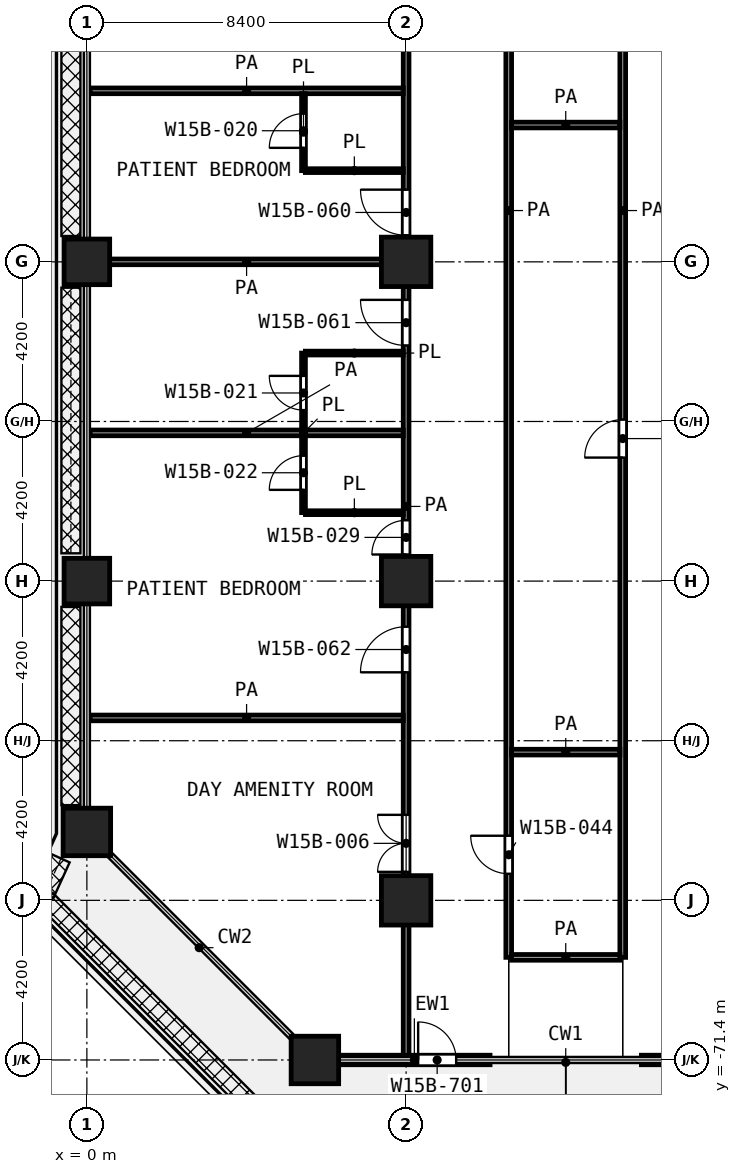
"""IFC4 building model, lengths in metres.
Left out: names, types, materials, properties, quantities, classifications, styles, units other than length and angle.
Written with IfcOpenShell. Run it as: python <this file> out.ifc"""

import sys

from ifc_helpers import new_model, si_unit, direction, frame, frame_2d, origin, origin_2d, place, context, subcontext, project, spatial, rectangle, extrude, element, fill, save


model = new_model("IFC4")
c1 = context("Model", 3, precision=1e-05, world=origin(), true_north=direction((0.0, 1.0)))
c2 = subcontext(c1, "Body", "Model", "MODEL_VIEW")
j1 = project(units=[si_unit("LENGTHUNIT", "METRE"), si_unit("PLANEANGLEUNIT", "RADIAN")], contexts=[c1])
p1 = place(None, origin())
s1 = spatial("IfcSite", under=j1, at=p1, CompositionType="ELEMENT")
p2 = place(p1, origin())
s2 = spatial("IfcBuilding", under=s1, at=p2, CompositionType="ELEMENT")
p3 = place(p2, frame((0.0, 0.0, 85.4)))
s3 = spatial("IfcBuildingStorey", under=s2, at=p3, CompositionType="ELEMENT", Elevation=85.4)
p4 = place(p3, frame((0.0, -50.4, 0.0), z_axis=(0.0, 0.0, 1.0), x_axis=(1.0, 0.0, 0.0)))
e1 = element("IfcColumn", 1, at=p4, inside=s3, PredefinedType="COLUMN", context=c2, shape_type="SweptSolid", body=[
    extrude(rectangle(XDim=1.2, YDim=1.2, at=origin_2d()), origin(), (0.0, 0.0, 1.0), 4.2),
])
p5 = place(p3, frame((8.4, -50.4, 0.0), z_axis=(0.0, 0.0, 1.0), x_axis=(1.0, 0.0, 0.0)))
e2 = element("IfcColumn", 2, at=p5, inside=s3, PredefinedType="COLUMN", context=c2, shape_type="SweptSolid", body=[
    extrude(rectangle(XDim=1.3, YDim=1.3, at=origin_2d()), origin(), (0.0, 0.0, 1.0), 4.2),
])
p6 = place(p3, frame((0.0, -58.8, 0.0), z_axis=(0.0, 0.0, 1.0), x_axis=(1.0, 0.0, 0.0)))
e3 = element("IfcColumn", 3, at=p6, inside=s3, PredefinedType="COLUMN", context=c2, shape_type="SweptSolid", body=[
    extrude(rectangle(XDim=1.2, YDim=1.2, at=origin_2d()), origin(), (0.0, 0.0, 1.0), 4.2),
])
p7 = place(p3, frame((8.4, -58.8, 0.0), z_axis=(0.0, 0.0, 1.0), x_axis=(1.0, 0.0, 0.0)))
e4 = element("IfcColumn", 4, at=p7, inside=s3, PredefinedType="COLUMN", context=c2, shape_type="SweptSolid", body=[
    extrude(rectangle(XDim=1.3, YDim=1.3, at=origin_2d()), origin(), (0.0, 0.0, 1.0), 4.2),
])
p8 = place(p3, frame((0.0, -65.4, 0.0), z_axis=(0.0, 0.0, 1.0), x_axis=(1.0, 0.0, 0.0)))
e5 = element("IfcColumn", 5, at=p8, inside=s3, PredefinedType="COLUMN", context=c2, shape_type="SweptSolid", body=[
    extrude(rectangle(XDim=1.25, YDim=1.25, at=origin_2d()), origin(), (0.0, 0.0, 1.0), 4.2),
])
p9 = place(p3, frame((8.4, -67.2, 0.0), z_axis=(0.0, 0.0, 1.0), x_axis=(1.0, 0.0, 0.0)))
e6 = element("IfcColumn", 6, at=p9, inside=s3, PredefinedType="COLUMN", context=c2, shape_type="SweptSolid", body=[
    extrude(rectangle(XDim=1.3, YDim=1.3, at=origin_2d()), origin(), (0.0, 0.0, 1.0), 4.2),
])
p10 = place(p3, frame((6.0, -71.4, 0.0), z_axis=(0.0, 0.0, 1.0), x_axis=(1.0, 0.0, 0.0)))
e7 = element("IfcColumn", 7, at=p10, inside=s3, PredefinedType="COLUMN", context=c2, shape_type="SweptSolid", body=[
    extrude(rectangle(XDim=1.25, YDim=1.25, at=origin_2d()), origin(), (0.0, 0.0, 1.0), 4.2),
])
p11 = place(p3, frame((6.625, -71.4, 0.0), z_axis=(0.0, 0.0, 1.0), x_axis=(1.0, 0.0, 0.0)))
e8 = element("IfcWall", 8, at=p11, inside=s3, PredefinedType="SOLIDWALL", context=c2, shape_type="SweptSolid", body=[
    extrude(rectangle(XDim=3.983, YDim=0.25, at=frame_2d((1.992, 0.0))), origin(), (0.0, 0.0, 1.0), 3.78),
])
p12 = place(p11, frame((2.092, 0.0, 0.0)))
e9 = element("IfcOpeningElement", 9, at=p12, cuts=e8, PredefinedType="OPENING", context=c2, shape_type="SweptSolid", body=[
    extrude(rectangle(XDim=1.0, YDim=2.1, at=frame_2d((0.5, 1.05))), frame((0.0, 0.135, 0.0), z_axis=(0.0, -1.0, 0.0), x_axis=(1.0, 0.0, 0.0)), (0.0, 0.0, 1.0), 0.27),
])
p13 = place(p3, frame((14.592, -71.4, 0.0), z_axis=(0.0, 0.0, 1.0), x_axis=(1.0, 0.0, 0.0)))
e10 = element("IfcWall", 10, at=p13, inside=s3, PredefinedType="SOLIDWALL", context=c2, shape_type="SweptSolid", body=[
    extrude(rectangle(XDim=3.983, YDim=0.25, at=frame_2d((1.992, 0.0))), origin(), (0.0, 0.0, 1.0), 3.78),
])
p14 = place(p13, frame((0.892, 0.0, 0.0)))
e11 = element("IfcOpeningElement", 11, at=p14, cuts=e10, PredefinedType="OPENING", context=c2, shape_type="SweptSolid", body=[
    extrude(rectangle(XDim=1.0, YDim=2.1, at=frame_2d((0.5, 1.05))), frame((0.0, 0.135, 0.0), z_axis=(0.0, -1.0, 0.0), x_axis=(1.0, 0.0, 0.0)), (0.0, 0.0, 1.0), 0.27),
])
p15 = place(p3, frame((5.751, -57.0, 0.0), z_axis=(0.0, 0.0, 1.0), x_axis=(1.0, 0.0, 0.0)))
e12 = element("IfcWall", 12, at=p15, inside=s3, PredefinedType="PARTITIONING", context=c2, shape_type="SweptSolid", body=[
    extrude(rectangle(XDim=2.574, YDim=0.1, at=frame_2d((1.287, 0.0))), origin(), (0.0, 0.0, 1.0), 3.9),
])
for number, where, z_axis, x_axis in (
    (13, (5.75, -52.8, 0.0), (0.0, 0.0, 1.0), (1.0, 0.0, 0.0)),
    (14, (5.75, -48.0, 0.0), (0.0, 0.0, 1.0), (1.0, 0.0, 0.0)),
):
    element("IfcWall", number, at=place(p3, frame(where, z_axis=z_axis, x_axis=x_axis)), inside=s3, PredefinedType="PARTITIONING", context=c2, shape_type="SweptSolid", body=[
        extrude(rectangle(XDim=2.575, YDim=0.1, at=frame_2d((1.288, 0.0))), origin(), (0.0, 0.0, 1.0), 3.9),
    ])
p16 = place(p3, frame((5.7, -56.998, 0.0), z_axis=(0.0, 0.0, 1.0), x_axis=(0.0, 1.0, 0.0)))
e15 = element("IfcWall", 15, at=p16, inside=s3, PredefinedType="PARTITIONING", context=c2, shape_type="SweptSolid", body=[
    extrude(rectangle(XDim=4.198, YDim=0.1, at=frame_2d((2.099, 0.0))), origin(), (0.0, 0.0, 1.0), 3.9),
])
p17 = place(p16, frame((2.698, 0.0, 0.0)))
e16 = element("IfcOpeningElement", 16, at=p17, cuts=e15, PredefinedType="OPENING", context=c2, shape_type="SweptSolid", body=[
    extrude(rectangle(XDim=0.9, YDim=2.1, at=frame_2d((0.45, 1.05))), frame((0.0, 0.06, 0.0), z_axis=(0.0, -1.0, 0.0), x_axis=(1.0, 0.0, 0.0)), (0.0, 0.0, 1.0), 0.12),
])
p18 = place(p16, frame((0.599, 0.0, 0.0)))
e17 = element("IfcOpeningElement", 17, at=p18, cuts=e15, PredefinedType="OPENING", context=c2, shape_type="SweptSolid", body=[
    extrude(rectangle(XDim=0.9, YDim=2.1, at=frame_2d((0.45, 1.05))), frame((0.0, 0.06, 0.0), z_axis=(0.0, -1.0, 0.0), x_axis=(1.0, 0.0, 0.0)), (0.0, 0.0, 1.0), 0.12),
])
p19 = place(p3, frame((5.7, -48.0, 0.0), z_axis=(0.0, 0.0, 1.0), x_axis=(0.0, 1.0, 0.0)))
e18 = element("IfcWall", 18, at=p19, inside=s3, PredefinedType="PARTITIONING", context=c2, shape_type="SweptSolid", body=[
    extrude(rectangle(XDim=2.025, YDim=0.1, at=frame_2d((1.012, 0.0))), origin(), (0.0, 0.0, 1.0), 3.9),
])
p20 = place(p19, frame((0.6, 0.0, 0.0)))
e19 = element("IfcOpeningElement", 19, at=p20, cuts=e18, PredefinedType="OPENING", context=c2, shape_type="SweptSolid", body=[
    extrude(rectangle(XDim=0.9, YDim=2.1, at=frame_2d((0.45, 1.05))), frame((0.0, 0.06, 0.0), z_axis=(0.0, -1.0, 0.0), x_axis=(1.0, 0.0, 0.0)), (0.0, 0.0, 1.0), 0.12),
])
for number, where, z_axis, x_axis in (
    (20, (11.175, -68.7, 0.0), (0.0, 0.0, 1.0), (1.0, 0.0, 0.0)),
    (21, (11.175, -63.3, 0.0), (0.0, 0.0, 1.0), (1.0, 0.0, 0.0)),
):
    element("IfcWall", number, at=place(p3, frame(where, z_axis=z_axis, x_axis=x_axis)), inside=s3, PredefinedType="PARTITIONING", context=c2, shape_type="SweptSolid", body=[
        extrude(rectangle(XDim=2.85, YDim=0.15, at=frame_2d((1.425, 0.0))), origin(), (0.0, 0.0, 1.0), 3.9),
    ])
for number, where, z_axis, x_axis in (
    (22, (0.08, -62.4, 0.0), (0.0, 0.0, 1.0), (1.0, 0.0, 0.0)),
    (23, (0.08, -54.9, 0.0), (0.0, 0.0, 1.0), (1.0, 0.0, 0.0)),
    (24, (0.08, -50.4, 0.0), (0.0, 0.0, 1.0), (1.0, 0.0, 0.0)),
):
    element("IfcWall", number, at=place(p3, frame(where, z_axis=z_axis, x_axis=x_axis)), inside=s3, PredefinedType="PARTITIONING", context=c2, shape_type="SweptSolid", body=[
        extrude(rectangle(XDim=8.245, YDim=0.15, at=frame_2d((4.123, 0.0))), origin(), (0.0, 0.0, 1.0), 3.9),
    ])
p21 = place(p3, frame((11.175, -46.8, 0.0), z_axis=(0.0, 0.0, 1.0), x_axis=(1.0, 0.0, 0.0)))
e25 = element("IfcWall", 25, at=p21, inside=s3, PredefinedType="PARTITIONING", context=c2, shape_type="SweptSolid", body=[
    extrude(rectangle(XDim=2.85, YDim=0.15, at=frame_2d((1.425, 0.0))), origin(), (0.0, 0.0, 1.0), 3.9),
])
p22 = place(p3, frame((0.08, -45.9, 0.0), z_axis=(0.0, 0.0, 1.0), x_axis=(1.0, 0.0, 0.0)))
e26 = element("IfcWall", 26, at=p22, inside=s3, PredefinedType="PARTITIONING", context=c2, shape_type="SweptSolid", body=[
    extrude(rectangle(XDim=8.245, YDim=0.15, at=frame_2d((4.123, 0.0))), origin(), (0.0, 0.0, 1.0), 3.9),
])
p23 = place(p3, frame((8.4, -71.32, 0.0), z_axis=(0.0, 0.0, 1.0), x_axis=(0.0, 1.0, 0.0)))
e27 = element("IfcWall", 27, at=p23, inside=s3, PredefinedType="PARTITIONING", context=c2, shape_type="SweptSolid", body=[
    extrude(rectangle(XDim=28.97, YDim=0.15, at=frame_2d((14.485, 0.0))), origin(), (0.0, 0.0, 1.0), 3.9),
])
p24 = place(p23, frame((21.62, 0.0, 0.0)))
e28 = element("IfcOpeningElement", 28, at=p24, cuts=e27, PredefinedType="OPENING", context=c2, shape_type="SweptSolid", body=[
    extrude(rectangle(XDim=1.2, YDim=2.1, at=frame_2d((0.6, 1.05))), frame((0.0, 0.085, 0.0), z_axis=(0.0, -1.0, 0.0), x_axis=(1.0, 0.0, 0.0)), (0.0, 0.0, 1.0), 0.17),
])
p25 = place(p23, frame((18.72, 0.0, 0.0)))
e29 = element("IfcOpeningElement", 29, at=p25, cuts=e27, PredefinedType="OPENING", context=c2, shape_type="SweptSolid", body=[
    extrude(rectangle(XDim=1.2, YDim=2.1, at=frame_2d((0.6, 1.05))), frame((0.0, 0.085, 0.0), z_axis=(0.0, -1.0, 0.0), x_axis=(1.0, 0.0, 0.0)), (0.0, 0.0, 1.0), 0.17),
])
p26 = place(p23, frame((10.12, 0.0, 0.0)))
e30 = element("IfcOpeningElement", 30, at=p26, cuts=e27, PredefinedType="OPENING", context=c2, shape_type="SweptSolid", body=[
    extrude(rectangle(XDim=1.2, YDim=2.1, at=frame_2d((0.6, 1.05))), frame((0.0, 0.085, 0.0), z_axis=(0.0, -1.0, 0.0), x_axis=(1.0, 0.0, 0.0)), (0.0, 0.0, 1.0), 0.17),
])
p27 = place(p23, frame((13.22, 0.0, 0.0)))
e31 = element("IfcOpeningElement", 31, at=p27, cuts=e27, PredefinedType="OPENING", context=c2, shape_type="SweptSolid", body=[
    extrude(rectangle(XDim=0.9, YDim=2.1, at=frame_2d((0.45, 1.05))), frame((0.0, 0.085, 0.0), z_axis=(0.0, -1.0, 0.0), x_axis=(1.0, 0.0, 0.0)), (0.0, 0.0, 1.0), 0.17),
])
p28 = place(p23, frame((4.87, 0.0, 0.0)))
e32 = element("IfcOpeningElement", 32, at=p28, cuts=e27, PredefinedType="OPENING", context=c2, shape_type="SweptSolid", body=[
    extrude(rectangle(XDim=1.5, YDim=2.1, at=frame_2d((0.75, 1.05))), frame((0.0, 0.085, 0.0), z_axis=(0.0, -1.0, 0.0), x_axis=(1.0, 0.0, 0.0)), (0.0, 0.0, 1.0), 0.17),
])
p29 = place(p3, frame((11.1, -68.7, 0.0), z_axis=(0.0, 0.0, 1.0), x_axis=(0.0, 1.0, 0.0)))
e33 = element("IfcWall", 33, at=p29, inside=s3, PredefinedType="PARTITIONING", context=c2, shape_type="SweptSolid", body=[
    extrude(rectangle(XDim=39.3, YDim=0.15, at=frame_2d((19.65, 0.0))), origin(), (0.0, 0.0, 1.0), 3.9),
])
p30 = place(p29, frame((34.6, 0.0, 0.0)))
e34 = element("IfcOpeningElement", 34, at=p30, cuts=e33, PredefinedType="OPENING", context=c2, shape_type="SweptSolid", body=[
    extrude(rectangle(XDim=1.0, YDim=2.1, at=frame_2d((0.5, 1.05))), frame((0.0, 0.085, 0.0), z_axis=(0.0, -1.0, 0.0), x_axis=(1.0, 0.0, 0.0)), (0.0, 0.0, 1.0), 0.17),
])
p31 = place(p29, frame((25.9, 0.0, 0.0)))
e35 = element("IfcOpeningElement", 35, at=p31, cuts=e33, PredefinedType="OPENING", context=c2, shape_type="SweptSolid", body=[
    extrude(rectangle(XDim=1.0, YDim=2.1, at=frame_2d((0.5, 1.05))), frame((0.0, 0.085, 0.0), z_axis=(0.0, -1.0, 0.0), x_axis=(1.0, 0.0, 0.0)), (0.0, 0.0, 1.0), 0.17),
])
p32 = place(p29, frame((2.2, 0.0, 0.0)))
e36 = element("IfcOpeningElement", 36, at=p32, cuts=e33, PredefinedType="OPENING", context=c2, shape_type="SweptSolid", body=[
    extrude(rectangle(XDim=1.0, YDim=2.1, at=frame_2d((0.5, 1.05))), frame((0.0, 0.085, 0.0), z_axis=(0.0, -1.0, 0.0), x_axis=(1.0, 0.0, 0.0)), (0.0, 0.0, 1.0), 0.17),
])
p33 = place(p3, frame((14.1, -68.7, 0.0), z_axis=(0.0, 0.0, 1.0), x_axis=(0.0, 1.0, 0.0)))
e37 = element("IfcWall", 37, at=p33, inside=s3, PredefinedType="PARTITIONING", context=c2, shape_type="SweptSolid", body=[
    extrude(rectangle(XDim=39.3, YDim=0.15, at=frame_2d((19.65, 0.0))), origin(), (0.0, 0.0, 1.0), 3.9),
])
p34 = place(p33, frame((13.15, 0.0, 0.0)))
e38 = element("IfcOpeningElement", 38, at=p34, cuts=e37, PredefinedType="OPENING", context=c2, shape_type="SweptSolid", body=[
    extrude(rectangle(XDim=1.0, YDim=2.1, at=frame_2d((0.5, 1.05))), frame((0.0, 0.085, 0.0), z_axis=(0.0, -1.0, 0.0), x_axis=(1.0, 0.0, 0.0)), (0.0, 0.0, 1.0), 0.17),
])
p35 = place(p12, origin())
e39 = element("IfcDoor", 39, at=p35, inside=s3, OperationType="SINGLE_SWING_LEFT", PredefinedType="DOOR", context=c2, shape_type="SweptSolid", body=[
    extrude(rectangle(XDim=1.0, YDim=2.1, at=frame_2d((0.5, 1.05))), frame((0.0, 0.025, 0.0), z_axis=(0.0, -1.0, 0.0), x_axis=(1.0, 0.0, 0.0)), (0.0, 0.0, 1.0), 0.05),
])
fill(e9, e39)
p36 = place(p24, origin())
e40 = element("IfcDoor", 40, at=p36, inside=s3, OperationType="SINGLE_SWING_RIGHT", PredefinedType="DOOR", context=c2, shape_type="SweptSolid", body=[
    extrude(rectangle(XDim=1.2, YDim=2.1, at=frame_2d((0.6, 1.05))), frame((0.0, 0.025, 0.0), z_axis=(0.0, -1.0, 0.0), x_axis=(1.0, 0.0, 0.0)), (0.0, 0.0, 1.0), 0.05),
])
fill(e28, e40)
p37 = place(p20, origin())
e41 = element("IfcDoor", 41, at=p37, inside=s3, OperationType="SINGLE_SWING_LEFT", PredefinedType="DOOR", context=c2, shape_type="SweptSolid", body=[
    extrude(rectangle(XDim=0.9, YDim=2.1, at=frame_2d((0.45, 1.05))), frame((0.0, 0.025, 0.0), z_axis=(0.0, -1.0, 0.0), x_axis=(1.0, 0.0, 0.0)), (0.0, 0.0, 1.0), 0.05),
])
fill(e19, e41)
p38 = place(p25, origin())
e42 = element("IfcDoor", 42, at=p38, inside=s3, OperationType="SINGLE_SWING_RIGHT", PredefinedType="DOOR", context=c2, shape_type="SweptSolid", body=[
    extrude(rectangle(XDim=1.2, YDim=2.1, at=frame_2d((0.6, 1.05))), frame((0.0, 0.025, 0.0), z_axis=(0.0, -1.0, 0.0), x_axis=(1.0, 0.0, 0.0)), (0.0, 0.0, 1.0), 0.05),
])
fill(e29, e42)
p39 = place(p17, origin())
e43 = element("IfcDoor", 43, at=p39, inside=s3, OperationType="SINGLE_SWING_RIGHT", PredefinedType="DOOR", context=c2, shape_type="SweptSolid", body=[
    extrude(rectangle(XDim=0.9, YDim=2.1, at=frame_2d((0.45, 1.05))), frame((0.0, 0.025, 0.0), z_axis=(0.0, -1.0, 0.0), x_axis=(1.0, 0.0, 0.0)), (0.0, 0.0, 1.0), 0.05),
])
fill(e16, e43)
p40 = place(p26, origin())
e44 = element("IfcDoor", 44, at=p40, inside=s3, OperationType="SINGLE_SWING_LEFT", PredefinedType="DOOR", context=c2, shape_type="SweptSolid", body=[
    extrude(rectangle(XDim=1.2, YDim=2.1, at=frame_2d((0.6, 1.05))), frame((0.0, 0.025, 0.0), z_axis=(0.0, -1.0, 0.0), x_axis=(1.0, 0.0, 0.0)), (0.0, 0.0, 1.0), 0.05),
])
fill(e30, e44)
p41 = place(p27, origin())
e45 = element("IfcDoor", 45, at=p41, inside=s3, OperationType="SINGLE_SWING_LEFT", PredefinedType="DOOR", context=c2, shape_type="SweptSolid", body=[
    extrude(rectangle(XDim=0.9, YDim=2.1, at=frame_2d((0.45, 1.05))), frame((0.0, 0.025, 0.0), z_axis=(0.0, -1.0, 0.0), x_axis=(1.0, 0.0, 0.0)), (0.0, 0.0, 1.0), 0.05),
])
fill(e31, e45)
p42 = place(p18, origin())
e46 = element("IfcDoor", 46, at=p42, inside=s3, OperationType="SINGLE_SWING_LEFT", PredefinedType="DOOR", context=c2, shape_type="SweptSolid", body=[
    extrude(rectangle(XDim=0.9, YDim=2.1, at=frame_2d((0.45, 1.05))), frame((0.0, 0.025, 0.0), z_axis=(0.0, -1.0, 0.0), x_axis=(1.0, 0.0, 0.0)), (0.0, 0.0, 1.0), 0.05),
])
fill(e17, e46)
p43 = place(p28, origin())
e47 = element("IfcDoor", 47, at=p43, inside=s3, OperationType="DOUBLE_DOOR_SINGLE_SWING", PredefinedType="DOOR", context=c2, shape_type="SweptSolid", body=[
    extrude(rectangle(XDim=1.5, YDim=2.1, at=frame_2d((0.75, 1.05))), frame((0.0, 0.025, 0.0), z_axis=(0.0, -1.0, 0.0), x_axis=(1.0, 0.0, 0.0)), (0.0, 0.0, 1.0), 0.05),
])
fill(e32, e47)
p44 = place(p34, origin())
e48 = element("IfcDoor", 48, at=p44, inside=s3, OperationType="SINGLE_SWING_LEFT", PredefinedType="DOOR", context=c2, shape_type="SweptSolid", body=[
    extrude(rectangle(XDim=1.0, YDim=2.1, at=frame_2d((0.5, 1.05))), frame((0.0, 0.025, 0.0), z_axis=(0.0, -1.0, 0.0), x_axis=(1.0, 0.0, 0.0)), (0.0, 0.0, 1.0), 0.05),
])
fill(e38, e48)
p45 = place(p32, origin())
e49 = element("IfcDoor", 49, at=p45, inside=s3, OperationType="SINGLE_SWING_RIGHT", PredefinedType="DOOR", context=c2, shape_type="SweptSolid", body=[
    extrude(rectangle(XDim=1.0, YDim=2.1, at=frame_2d((0.5, 1.05))), frame((0.0, 0.025, 0.0), z_axis=(0.0, -1.0, 0.0), x_axis=(1.0, 0.0, 0.0)), (0.0, 0.0, 1.0), 0.05),
])
fill(e36, e49)
save(model, sys.argv[1])
